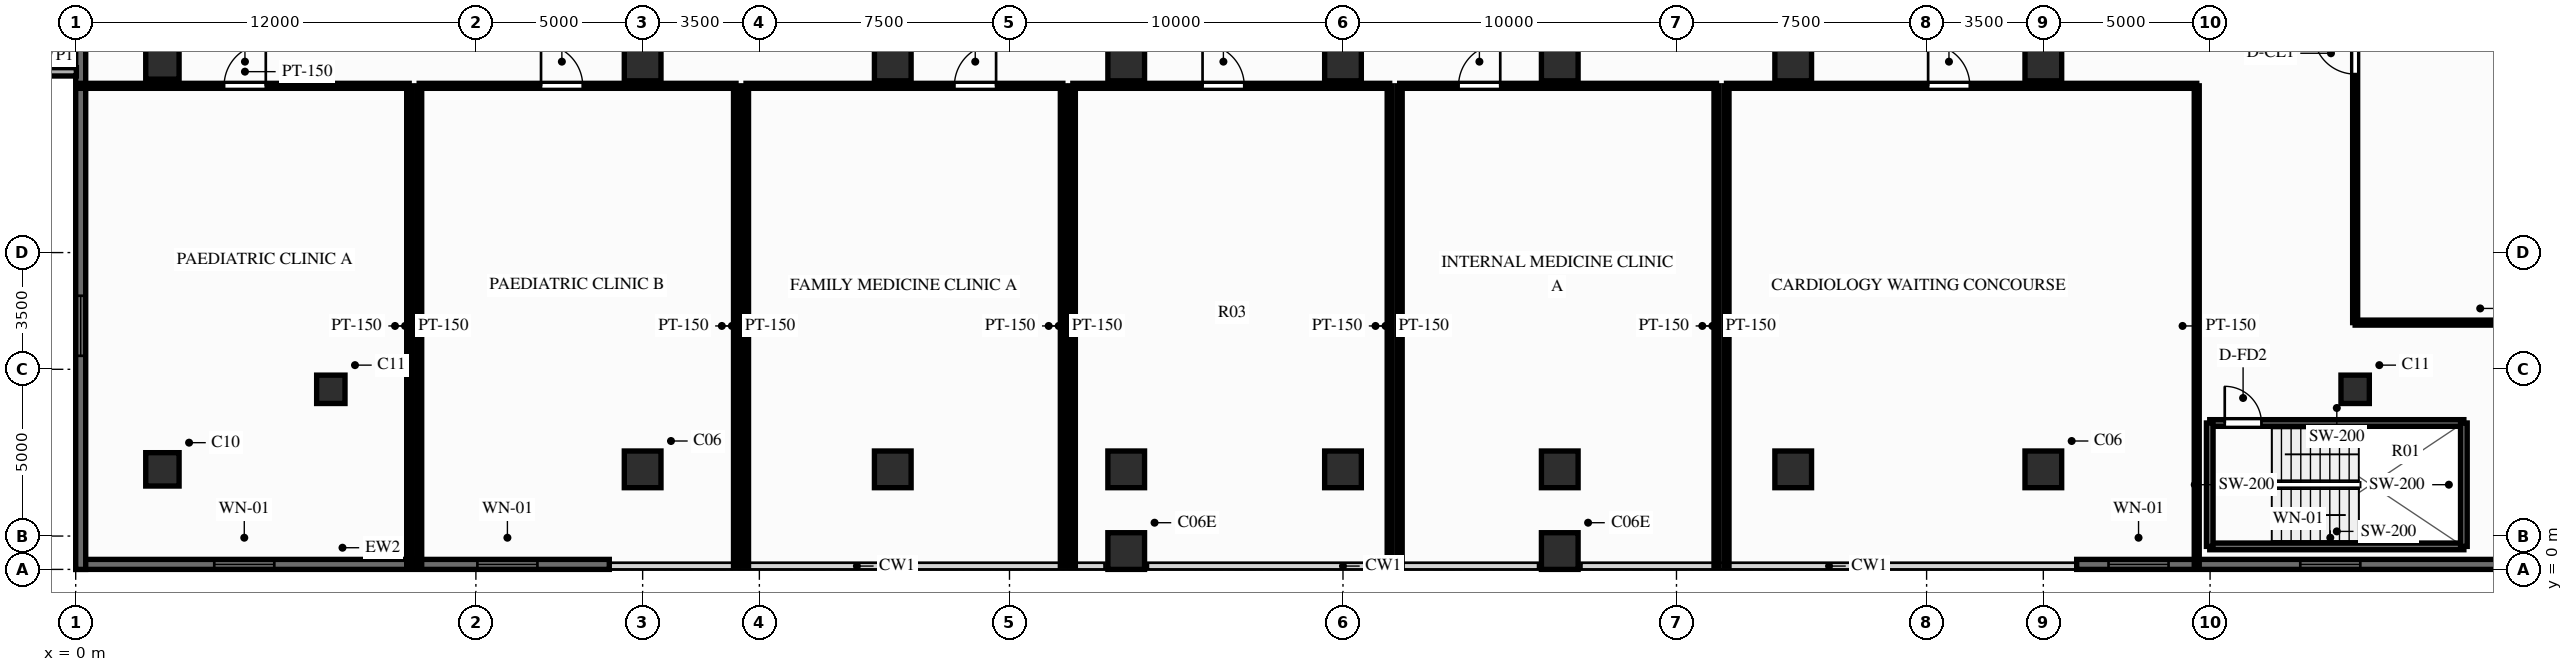
"""IFC4 building model, lengths in metres.
Left out: names, types, materials, properties, quantities, classifications, styles, units other than length and angle.
Written with IfcOpenShell. Run it as: python <this file> out.ifc"""

import sys

from ifc_helpers import new_model, si_unit, direction, frame, frame_2d, origin, origin_2d, place, context, subcontext, project, spatial, rectangle, circle, extrude, source, transform, mapped, element, fill, save


model = new_model("IFC4")
c1 = context("Model", 3, precision=1e-05, world=origin(), true_north=direction((0.0, 1.0)))
c2 = subcontext(c1, "Body", "Model", "MODEL_VIEW")
j1 = project(units=[si_unit("LENGTHUNIT", "METRE"), si_unit("PLANEANGLEUNIT", "RADIAN")], contexts=[c1])
p1 = place(None, origin())
s1 = spatial("IfcSite", under=j1, at=p1, CompositionType="ELEMENT")
p2 = place(p1, origin())
s2 = spatial("IfcBuilding", under=s1, at=p2, CompositionType="ELEMENT")
p3 = place(p2, frame((0.0, 0.0, 4.2)))
s3 = spatial("IfcBuildingStorey", under=s2, at=p3, CompositionType="ELEMENT", Elevation=4.2)
m1 = source(origin(), c2, "Body", "SweptSolid", [
    extrude(circle(Radius=0.5, at=origin_2d()), origin(), (0.0, 0.0, 1.0), 3.6),
])
for number, where, z_axis, x_axis in (
    (1, (2.6, 3.0, 0.0), (0.0, 0.0, 1.0), (1.0, 0.0, 0.0)),
    (2, (2.6, 15.2, 0.0), (0.0, 0.0, 1.0), (1.0, 0.0, 0.0)),
):
    element("IfcColumn", number, at=place(p3, frame(where, z_axis=z_axis, x_axis=x_axis)), inside=s3, PredefinedType="COLUMN", context=c2, shape_type="MappedRepresentation", body=[
        mapped(m1, transform((0.0, 0.0, 0.0), scale=1.0)),
    ])
m2 = source(origin(), c2, "Body", "SweptSolid", [
    extrude(circle(Radius=0.425, at=origin_2d()), origin(), (0.0, 0.0, 1.0), 3.6),
])
for number, where, z_axis, x_axis in (
    (3, (7.65, 5.4, 0.0), (0.0, 0.0, 1.0), (1.0, 0.0, 0.0)),
    (4, (68.35, 5.4, 0.0), (0.0, 0.0, 1.0), (1.0, 0.0, 0.0)),
):
    element("IfcColumn", number, at=place(p3, frame(where, z_axis=z_axis, x_axis=x_axis)), inside=s3, PredefinedType="COLUMN", context=c2, shape_type="MappedRepresentation", body=[
        mapped(m2, transform((0.0, 0.0, 0.0), scale=1.0)),
    ])
m3 = source(origin(), c2, "Body", "SweptSolid", [
    extrude(rectangle(XDim=1.1, YDim=1.1, at=origin_2d()), origin(), (0.0, 0.0, 1.0), 3.6),
])
for number, where, z_axis, x_axis in (
    (5, (17.0, 3.0, 0.0), (0.0, 0.0, 1.0), (1.0, 0.0, 0.0)),
    (6, (59.0, 3.0, 0.0), (0.0, 0.0, 1.0), (1.0, 0.0, 0.0)),
    (7, (17.0, 15.2, 0.0), (0.0, 0.0, 1.0), (1.0, 0.0, 0.0)),
    (8, (59.0, 15.2, 0.0), (0.0, 0.0, 1.0), (1.0, 0.0, 0.0)),
    (9, (24.5, 3.0, 0.0), (0.0, 0.0, 1.0), (1.0, 0.0, 0.0)),
    (10, (24.5, 15.2, 0.0), (0.0, 0.0, 1.0), (1.0, 0.0, 0.0)),
    (11, (31.5, 0.55, 0.0), (0.0, 0.0, 1.0), (1.0, 0.0, 0.0)),
    (12, (31.5, 3.0, 0.0), (0.0, 0.0, 1.0), (1.0, 0.0, 0.0)),
    (13, (31.5, 15.2, 0.0), (0.0, 0.0, 1.0), (1.0, 0.0, 0.0)),
    (14, (38.0, 3.0, 0.0), (0.0, 0.0, 1.0), (1.0, 0.0, 0.0)),
    (15, (38.0, 15.2, 0.0), (0.0, 0.0, 1.0), (1.0, 0.0, 0.0)),
    (16, (44.5, 0.55, 0.0), (0.0, 0.0, 1.0), (1.0, 0.0, 0.0)),
    (17, (44.5, 3.0, 0.0), (0.0, 0.0, 1.0), (1.0, 0.0, 0.0)),
    (18, (44.5, 15.2, 0.0), (0.0, 0.0, 1.0), (1.0, 0.0, 0.0)),
    (19, (51.5, 3.0, 0.0), (0.0, 0.0, 1.0), (1.0, 0.0, 0.0)),
    (20, (51.5, 15.2, 0.0), (0.0, 0.0, 1.0), (1.0, 0.0, 0.0)),
):
    element("IfcColumn", number, at=place(p3, frame(where, z_axis=z_axis, x_axis=x_axis)), inside=s3, PredefinedType="COLUMN", context=c2, shape_type="MappedRepresentation", body=[
        mapped(m3, transform((0.0, 0.0, 0.0), scale=1.0)),
    ])
p4 = place(p3, frame((0.0, 0.15, 0.0), z_axis=(0.0, 0.0, 1.0), x_axis=(1.0, 0.0, 0.0)))
e21 = element("IfcWall", 21, at=p4, inside=s3, PredefinedType="SOLIDWALL", context=c2, shape_type="SweptSolid", body=[
    extrude(rectangle(XDim=16.0, YDim=0.3, at=frame_2d((8.0, 0.0))), origin(), (0.0, 0.0, 1.0), 2.88),
])
p5 = place(p4, frame((4.155, 0.0, 0.85)))
e22 = element("IfcOpeningElement", 22, at=p5, cuts=e21, PredefinedType="OPENING", context=c2, shape_type="SweptSolid", body=[
    extrude(rectangle(XDim=1.8, YDim=1.65, at=frame_2d((0.9, 0.825))), frame((0.0, 0.162, 0.0), z_axis=(0.0, -1.0, 0.0), x_axis=(1.0, 0.0, 0.0)), (0.0, 0.0, 1.0), 0.324),
])
p6 = place(p4, frame((12.045, 0.0, 0.85)))
e23 = element("IfcOpeningElement", 23, at=p6, cuts=e21, PredefinedType="OPENING", context=c2, shape_type="SweptSolid", body=[
    extrude(rectangle(XDim=1.8, YDim=1.65, at=frame_2d((0.9, 0.825))), frame((0.0, 0.162, 0.0), z_axis=(0.0, -1.0, 0.0), x_axis=(1.0, 0.0, 0.0)), (0.0, 0.0, 1.0), 0.324),
])
p7 = place(p3, frame((60.0, 0.15, 0.0), z_axis=(0.0, 0.0, 1.0), x_axis=(1.0, 0.0, 0.0)))
e24 = element("IfcWall", 24, at=p7, inside=s3, PredefinedType="SOLIDWALL", context=c2, shape_type="SweptSolid", body=[
    extrude(rectangle(XDim=16.0, YDim=0.3, at=frame_2d((8.0, 0.0))), origin(), (0.0, 0.0, 1.0), 2.88),
])
p8 = place(p7, frame((0.955, 0.0, 0.85)))
e25 = element("IfcOpeningElement", 25, at=p8, cuts=e24, PredefinedType="OPENING", context=c2, shape_type="SweptSolid", body=[
    extrude(rectangle(XDim=1.8, YDim=1.65, at=frame_2d((0.9, 0.825))), frame((0.0, 0.162, 0.0), z_axis=(0.0, -1.0, 0.0), x_axis=(1.0, 0.0, 0.0)), (0.0, 0.0, 1.0), 0.324),
])
p9 = place(p7, frame((6.705, 0.0, 0.85)))
e26 = element("IfcOpeningElement", 26, at=p9, cuts=e24, PredefinedType="OPENING", context=c2, shape_type="SweptSolid", body=[
    extrude(rectangle(XDim=1.8, YDim=1.65, at=frame_2d((0.9, 0.825))), frame((0.0, 0.162, 0.0), z_axis=(0.0, -1.0, 0.0), x_axis=(1.0, 0.0, 0.0)), (0.0, 0.0, 1.0), 0.324),
])
p10 = place(p7, frame((12.85, 0.0, 0.85)))
e27 = element("IfcOpeningElement", 27, at=p10, cuts=e24, PredefinedType="OPENING", context=c2, shape_type="SweptSolid", body=[
    extrude(rectangle(XDim=1.8, YDim=1.65, at=frame_2d((0.9, 0.825))), frame((0.0, 0.162, 0.0), z_axis=(0.0, -1.0, 0.0), x_axis=(1.0, 0.0, 0.0)), (0.0, 0.0, 1.0), 0.324),
])
p11 = place(p3, frame((0.15, 0.0, 0.0), z_axis=(0.0, 0.0, 1.0), x_axis=(0.0, 1.0, 0.0)))
e28 = element("IfcWall", 28, at=p11, inside=s3, PredefinedType="SOLIDWALL", context=c2, shape_type="SweptSolid", body=[
    extrude(rectangle(XDim=54.0, YDim=0.3, at=frame_2d((27.0, 0.0))), origin(), (0.0, 0.0, 1.0), 2.88),
])
p12 = place(p11, frame((6.405, 0.0, 0.85)))
e29 = element("IfcOpeningElement", 29, at=p12, cuts=e28, PredefinedType="OPENING", context=c2, shape_type="SweptSolid", body=[
    extrude(rectangle(XDim=1.8, YDim=1.65, at=frame_2d((0.9, 0.825))), frame((0.0, 0.162, 0.0), z_axis=(0.0, -1.0, 0.0), x_axis=(1.0, 0.0, 0.0)), (0.0, 0.0, 1.0), 0.324),
])
p13 = place(p11, frame((26.045, 0.0, 0.85)))
e30 = element("IfcOpeningElement", 30, at=p13, cuts=e28, PredefinedType="OPENING", context=c2, shape_type="SweptSolid", body=[
    extrude(rectangle(XDim=1.8, YDim=1.65, at=frame_2d((0.9, 0.825))), frame((0.0, 0.162, 0.0), z_axis=(0.0, -1.0, 0.0), x_axis=(1.0, 0.0, 0.0)), (0.0, 0.0, 1.0), 0.324),
])
p14 = place(p3, frame((-3.5, 14.92, 0.0), z_axis=(0.0, 0.0, 1.0), x_axis=(1.0, 0.0, 0.0)))
e31 = element("IfcWall", 31, at=p14, inside=s3, PredefinedType="PARAPET", context=c2, shape_type="SweptSolid", body=[
    extrude(rectangle(XDim=3.52, YDim=0.25, at=frame_2d((1.76, 0.0))), origin(), (0.0, 0.0, 1.0), 0.75),
])
p15 = place(p3, frame((63.99, 0.69, 0.0), z_axis=(0.0, 0.0, 1.0), x_axis=(1.0, 0.0, 0.0)))
e32 = element("IfcWall", 32, at=p15, inside=s3, PredefinedType="SOLIDWALL", context=c2, shape_type="SweptSolid", body=[
    extrude(rectangle(XDim=7.62, YDim=0.2, at=frame_2d((3.81, 0.0))), origin(), (0.0, 0.0, 1.0), 3.32),
])
p16 = place(p3, frame((63.99, 4.39, 0.0), z_axis=(0.0, 0.0, 1.0), x_axis=(1.0, 0.0, 0.0)))
e33 = element("IfcWall", 33, at=p16, inside=s3, PredefinedType="SOLIDWALL", context=c2, shape_type="SweptSolid", body=[
    extrude(rectangle(XDim=7.62, YDim=0.2, at=frame_2d((3.81, 0.0))), origin(), (0.0, 0.0, 1.0), 3.32),
])
p17 = place(p16, frame((0.45, 0.0, 0.0)))
e34 = element("IfcOpeningElement", 34, at=p17, cuts=e33, PredefinedType="OPENING", context=c2, shape_type="SweptSolid", body=[
    extrude(rectangle(XDim=1.1, YDim=2.15, at=frame_2d((0.55, 1.075))), frame((0.0, 0.112, 0.0), z_axis=(0.0, -1.0, 0.0), x_axis=(1.0, 0.0, 0.0)), (0.0, 0.0, 1.0), 0.224),
])
for number, where, z_axis, x_axis in (
    (35, (63.99, 0.69, 0.0), (0.0, 0.0, 1.0), (0.0, 1.0, 0.0)),
    (36, (71.61, 0.69, 0.0), (0.0, 0.0, 1.0), (0.0, 1.0, 0.0)),
):
    element("IfcWall", number, at=place(p3, frame(where, z_axis=z_axis, x_axis=x_axis)), inside=s3, PredefinedType="SOLIDWALL", context=c2, shape_type="SweptSolid", body=[
        extrude(rectangle(XDim=3.7, YDim=0.2, at=frame_2d((1.85, 0.0))), origin(), (0.0, 0.0, 1.0), 3.32),
    ])
p18 = place(p3, frame((0.15, 14.5, 0.0), z_axis=(0.0, 0.0, 1.0), x_axis=(1.0, 0.0, 0.0)))
e37 = element("IfcWall", 37, at=p18, inside=s3, PredefinedType="PARTITIONING", context=c2, shape_type="SweptSolid", body=[
    extrude(rectangle(XDim=9.85, YDim=0.15, at=frame_2d((4.925, 0.0))), origin(), (0.0, 0.0, 1.0), 3.32),
])
p19 = place(p18, frame((4.3, 0.0, 0.0)))
e38 = element("IfcOpeningElement", 38, at=p19, cuts=e37, PredefinedType="OPENING", context=c2, shape_type="SweptSolid", body=[
    extrude(rectangle(XDim=1.25, YDim=2.15, at=frame_2d((0.625, 1.075))), frame((0.0, 0.087, 0.0), z_axis=(0.0, -1.0, 0.0), x_axis=(1.0, 0.0, 0.0)), (0.0, 0.0, 1.0), 0.174),
])
p20 = place(p3, frame((10.0, 0.1, 0.0), z_axis=(0.0, 0.0, 1.0), x_axis=(0.0, 1.0, 0.0)))
e39 = element("IfcWall", 39, at=p20, inside=s3, PredefinedType="PARTITIONING", context=c2, shape_type="SweptSolid", body=[
    extrude(rectangle(XDim=14.4, YDim=0.15, at=frame_2d((7.2, 0.0))), origin(), (0.0, 0.0, 1.0), 3.32),
])
p21 = place(p3, frame((10.3, 14.5, 0.0), z_axis=(0.0, 0.0, 1.0), x_axis=(1.0, 0.0, 0.0)))
e40 = element("IfcWall", 40, at=p21, inside=s3, PredefinedType="PARTITIONING", context=c2, shape_type="SweptSolid", body=[
    extrude(rectangle(XDim=9.5, YDim=0.15, at=frame_2d((4.75, 0.0))), origin(), (0.0, 0.0, 1.0), 3.32),
])
p22 = place(p21, frame((3.653, 0.0, 0.0)))
e41 = element("IfcOpeningElement", 41, at=p22, cuts=e40, PredefinedType="OPENING", context=c2, shape_type="SweptSolid", body=[
    extrude(rectangle(XDim=1.25, YDim=2.15, at=frame_2d((0.625, 1.075))), frame((0.0, 0.087, 0.0), z_axis=(0.0, -1.0, 0.0), x_axis=(1.0, 0.0, 0.0)), (0.0, 0.0, 1.0), 0.174),
])
for number, where, z_axis, x_axis in (
    (42, (10.3, 0.1, 0.0), (0.0, 0.0, 1.0), (0.0, 1.0, 0.0)),
    (43, (19.8, 0.1, 0.0), (0.0, 0.0, 1.0), (0.0, 1.0, 0.0)),
):
    element("IfcWall", number, at=place(p3, frame(where, z_axis=z_axis, x_axis=x_axis)), inside=s3, PredefinedType="PARTITIONING", context=c2, shape_type="SweptSolid", body=[
        extrude(rectangle(XDim=14.4, YDim=0.15, at=frame_2d((7.2, 0.0))), origin(), (0.0, 0.0, 1.0), 3.32),
    ])
p23 = place(p3, frame((20.1, 14.5, 0.0), z_axis=(0.0, 0.0, 1.0), x_axis=(1.0, 0.0, 0.0)))
e44 = element("IfcWall", 44, at=p23, inside=s3, PredefinedType="PARTITIONING", context=c2, shape_type="SweptSolid", body=[
    extrude(rectangle(XDim=9.5, YDim=0.15, at=frame_2d((4.75, 0.0))), origin(), (0.0, 0.0, 1.0), 3.32),
])
p24 = place(p23, frame((6.248, 0.0, 0.0)))
e45 = element("IfcOpeningElement", 45, at=p24, cuts=e44, PredefinedType="OPENING", context=c2, shape_type="SweptSolid", body=[
    extrude(rectangle(XDim=1.25, YDim=2.15, at=frame_2d((0.625, 1.075))), frame((0.0, 0.087, 0.0), z_axis=(0.0, -1.0, 0.0), x_axis=(1.0, 0.0, 0.0)), (0.0, 0.0, 1.0), 0.174),
])
for number, where, z_axis, x_axis in (
    (46, (20.1, 0.1, 0.0), (0.0, 0.0, 1.0), (0.0, 1.0, 0.0)),
    (47, (29.6, 0.1, 0.0), (0.0, 0.0, 1.0), (0.0, 1.0, 0.0)),
):
    element("IfcWall", number, at=place(p3, frame(where, z_axis=z_axis, x_axis=x_axis)), inside=s3, PredefinedType="PARTITIONING", context=c2, shape_type="SweptSolid", body=[
        extrude(rectangle(XDim=14.4, YDim=0.15, at=frame_2d((7.2, 0.0))), origin(), (0.0, 0.0, 1.0), 3.32),
    ])
p25 = place(p3, frame((29.9, 14.5, 0.0), z_axis=(0.0, 0.0, 1.0), x_axis=(1.0, 0.0, 0.0)))
e48 = element("IfcWall", 48, at=p25, inside=s3, PredefinedType="PARTITIONING", context=c2, shape_type="SweptSolid", body=[
    extrude(rectangle(XDim=9.5, YDim=0.15, at=frame_2d((4.75, 0.0))), origin(), (0.0, 0.0, 1.0), 3.32),
])
p26 = place(p25, frame((3.889, 0.0, 0.0)))
e49 = element("IfcOpeningElement", 49, at=p26, cuts=e48, PredefinedType="OPENING", context=c2, shape_type="SweptSolid", body=[
    extrude(rectangle(XDim=1.25, YDim=2.15, at=frame_2d((0.625, 1.075))), frame((0.0, 0.087, 0.0), z_axis=(0.0, -1.0, 0.0), x_axis=(1.0, 0.0, 0.0)), (0.0, 0.0, 1.0), 0.174),
])
for number, where, z_axis, x_axis in (
    (50, (29.9, 0.1, 0.0), (0.0, 0.0, 1.0), (0.0, 1.0, 0.0)),
    (51, (39.4, 0.1, 0.0), (0.0, 0.0, 1.0), (0.0, 1.0, 0.0)),
):
    element("IfcWall", number, at=place(p3, frame(where, z_axis=z_axis, x_axis=x_axis)), inside=s3, PredefinedType="PARTITIONING", context=c2, shape_type="SweptSolid", body=[
        extrude(rectangle(XDim=14.4, YDim=0.15, at=frame_2d((7.2, 0.0))), origin(), (0.0, 0.0, 1.0), 3.32),
    ])
p27 = place(p3, frame((39.7, 14.5, 0.0), z_axis=(0.0, 0.0, 1.0), x_axis=(1.0, 0.0, 0.0)))
e52 = element("IfcWall", 52, at=p27, inside=s3, PredefinedType="PARTITIONING", context=c2, shape_type="SweptSolid", body=[
    extrude(rectangle(XDim=9.5, YDim=0.15, at=frame_2d((4.75, 0.0))), origin(), (0.0, 0.0, 1.0), 3.32),
])
p28 = place(p27, frame((1.766, 0.0, 0.0)))
e53 = element("IfcOpeningElement", 53, at=p28, cuts=e52, PredefinedType="OPENING", context=c2, shape_type="SweptSolid", body=[
    extrude(rectangle(XDim=1.25, YDim=2.15, at=frame_2d((0.625, 1.075))), frame((0.0, 0.087, 0.0), z_axis=(0.0, -1.0, 0.0), x_axis=(1.0, 0.0, 0.0)), (0.0, 0.0, 1.0), 0.174),
])
for number, where, z_axis, x_axis in (
    (54, (39.7, 0.1, 0.0), (0.0, 0.0, 1.0), (0.0, 1.0, 0.0)),
    (55, (49.2, 0.1, 0.0), (0.0, 0.0, 1.0), (0.0, 1.0, 0.0)),
):
    element("IfcWall", number, at=place(p3, frame(where, z_axis=z_axis, x_axis=x_axis)), inside=s3, PredefinedType="PARTITIONING", context=c2, shape_type="SweptSolid", body=[
        extrude(rectangle(XDim=14.4, YDim=0.15, at=frame_2d((7.2, 0.0))), origin(), (0.0, 0.0, 1.0), 3.32),
    ])
p29 = place(p3, frame((49.5, 14.5, 0.0), z_axis=(0.0, 0.0, 1.0), x_axis=(1.0, 0.0, 0.0)))
e56 = element("IfcWall", 56, at=p29, inside=s3, PredefinedType="PARTITIONING", context=c2, shape_type="SweptSolid", body=[
    extrude(rectangle(XDim=14.1, YDim=0.15, at=frame_2d((7.05, 0.0))), origin(), (0.0, 0.0, 1.0), 3.32),
])
p30 = place(p29, frame((6.045, 0.0, 0.0)))
e57 = element("IfcOpeningElement", 57, at=p30, cuts=e56, PredefinedType="OPENING", context=c2, shape_type="SweptSolid", body=[
    extrude(rectangle(XDim=1.25, YDim=2.15, at=frame_2d((0.625, 1.075))), frame((0.0, 0.087, 0.0), z_axis=(0.0, -1.0, 0.0), x_axis=(1.0, 0.0, 0.0)), (0.0, 0.0, 1.0), 0.174),
])
for number, where, z_axis, x_axis in (
    (58, (49.5, 0.1, 0.0), (0.0, 0.0, 1.0), (0.0, 1.0, 0.0)),
    (59, (63.6, 0.1, 0.0), (0.0, 0.0, 1.0), (0.0, 1.0, 0.0)),
):
    element("IfcWall", number, at=place(p3, frame(where, z_axis=z_axis, x_axis=x_axis)), inside=s3, PredefinedType="PARTITIONING", context=c2, shape_type="SweptSolid", body=[
        extrude(rectangle(XDim=14.4, YDim=0.15, at=frame_2d((7.2, 0.0))), origin(), (0.0, 0.0, 1.0), 3.32),
    ])
p31 = place(p3, frame((68.35, 7.4, 0.0), z_axis=(0.0, 0.0, 1.0), x_axis=(1.0, 0.0, 0.0)))
e60 = element("IfcWall", 60, at=p31, inside=s3, PredefinedType="PARTITIONING", context=c2, shape_type="SweptSolid", body=[
    extrude(rectangle(XDim=7.5, YDim=0.15, at=frame_2d((3.75, 0.0))), origin(), (0.0, 0.0, 1.0), 3.32),
])
p32 = place(p3, frame((68.35, 7.4, 0.0), z_axis=(0.0, 0.0, 1.0), x_axis=(0.0, 1.0, 0.0)))
e61 = element("IfcWall", 61, at=p32, inside=s3, PredefinedType="PARTITIONING", context=c2, shape_type="SweptSolid", body=[
    extrude(rectangle(XDim=17.1, YDim=0.15, at=frame_2d((8.55, 0.0))), origin(), (0.0, 0.0, 1.0), 2.84),
])
p33 = place(p32, frame((7.452, 0.0, 0.0)))
e62 = element("IfcOpeningElement", 62, at=p33, cuts=e61, PredefinedType="OPENING", context=c2, shape_type="SweptSolid", body=[
    extrude(rectangle(XDim=1.25, YDim=2.15, at=frame_2d((0.625, 1.075))), frame((0.0, 0.087, 0.0), z_axis=(0.0, -1.0, 0.0), x_axis=(1.0, 0.0, 0.0)), (0.0, 0.0, 1.0), 0.174),
])
m4 = source(origin(), c2, "Body", "SweptSolid", [
    extrude(rectangle(XDim=1.8, YDim=1.65, at=frame_2d((0.9, 0.825))), frame((0.0, 0.03, 0.0), z_axis=(0.0, -1.0, 0.0), x_axis=(1.0, 0.0, 0.0)), (0.0, 0.0, 1.0), 0.06),
])
p34 = place(p5, origin())
e63 = element("IfcWindow", 63, at=p34, inside=s3, PartitioningType="SINGLE_PANEL", PredefinedType="WINDOW", context=c2, shape_type="MappedRepresentation", body=[
    mapped(m4, transform((0.0, 0.0, 0.0), scale=1.0)),
])
fill(e22, e63)
p35 = place(p6, origin())
e64 = element("IfcWindow", 64, at=p35, inside=s3, PartitioningType="SINGLE_PANEL", PredefinedType="WINDOW", context=c2, shape_type="MappedRepresentation", body=[
    mapped(m4, transform((0.0, 0.0, 0.0), scale=1.0)),
])
fill(e23, e64)
p36 = place(p8, origin())
e65 = element("IfcWindow", 65, at=p36, inside=s3, PartitioningType="SINGLE_PANEL", PredefinedType="WINDOW", context=c2, shape_type="MappedRepresentation", body=[
    mapped(m4, transform((0.0, 0.0, 0.0), scale=1.0)),
])
fill(e25, e65)
p37 = place(p9, origin())
e66 = element("IfcWindow", 66, at=p37, inside=s3, PartitioningType="SINGLE_PANEL", PredefinedType="WINDOW", context=c2, shape_type="MappedRepresentation", body=[
    mapped(m4, transform((0.0, 0.0, 0.0), scale=1.0)),
])
fill(e26, e66)
p38 = place(p12, origin())
e67 = element("IfcWindow", 67, at=p38, inside=s3, PartitioningType="SINGLE_PANEL", PredefinedType="WINDOW", context=c2, shape_type="MappedRepresentation", body=[
    mapped(m4, transform((0.0, 0.0, 0.0), scale=1.0)),
])
fill(e29, e67)
m5 = source(origin(), c2, "Body", "SweptSolid", [
    extrude(rectangle(XDim=1.1, YDim=2.15, at=frame_2d((0.55, 1.075))), frame((0.0, 0.025, 0.0), z_axis=(0.0, -1.0, 0.0), x_axis=(1.0, 0.0, 0.0)), (0.0, 0.0, 1.0), 0.05),
])
p39 = place(p17, origin())
e68 = element("IfcDoor", 68, at=p39, inside=s3, OperationType="SINGLE_SWING_LEFT", PredefinedType="DOOR", context=c2, shape_type="MappedRepresentation", body=[
    mapped(m5, transform((0.0, 0.0, 0.0), scale=1.0)),
])
fill(e34, e68)
m6 = source(origin(), c2, "Body", "SweptSolid", [
    extrude(rectangle(XDim=1.25, YDim=2.15, at=frame_2d((0.625, 1.075))), frame((0.0, 0.025, 0.0), z_axis=(0.0, -1.0, 0.0), x_axis=(1.0, 0.0, 0.0)), (0.0, 0.0, 1.0), 0.05),
])
p40 = place(p19, origin())
e69 = element("IfcDoor", 69, at=p40, inside=s3, OperationType="SINGLE_SWING_RIGHT", PredefinedType="DOOR", context=c2, shape_type="MappedRepresentation", body=[
    mapped(m6, transform((0.0, 0.0, 0.0), scale=1.0)),
])
fill(e38, e69)
p41 = place(p22, origin())
e70 = element("IfcDoor", 70, at=p41, inside=s3, OperationType="SINGLE_SWING_LEFT", PredefinedType="DOOR", context=c2, shape_type="MappedRepresentation", body=[
    mapped(m6, transform((0.0, 0.0, 0.0), scale=1.0)),
])
fill(e41, e70)
p42 = place(p24, origin())
e71 = element("IfcDoor", 71, at=p42, inside=s3, OperationType="SINGLE_SWING_RIGHT", PredefinedType="DOOR", context=c2, shape_type="MappedRepresentation", body=[
    mapped(m6, transform((0.0, 0.0, 0.0), scale=1.0)),
])
fill(e45, e71)
p43 = place(p26, origin())
e72 = element("IfcDoor", 72, at=p43, inside=s3, OperationType="SINGLE_SWING_LEFT", PredefinedType="DOOR", context=c2, shape_type="MappedRepresentation", body=[
    mapped(m6, transform((0.0, 0.0, 0.0), scale=1.0)),
])
fill(e49, e72)
p44 = place(p28, origin())
e73 = element("IfcDoor", 73, at=p44, inside=s3, OperationType="SINGLE_SWING_RIGHT", PredefinedType="DOOR", context=c2, shape_type="MappedRepresentation", body=[
    mapped(m6, transform((0.0, 0.0, 0.0), scale=1.0)),
])
fill(e53, e73)
p45 = place(p30, origin())
e74 = element("IfcDoor", 74, at=p45, inside=s3, OperationType="SINGLE_SWING_LEFT", PredefinedType="DOOR", context=c2, shape_type="MappedRepresentation", body=[
    mapped(m6, transform((0.0, 0.0, 0.0), scale=1.0)),
])
fill(e57, e74)
p46 = place(p33, origin())
e75 = element("IfcDoor", 75, at=p46, inside=s3, OperationType="SINGLE_SWING_RIGHT", PredefinedType="DOOR", context=c2, shape_type="MappedRepresentation", body=[
    mapped(m6, transform((0.0, 0.0, 0.0), scale=1.0)),
])
fill(e62, e75)
save(model, sys.argv[1])
